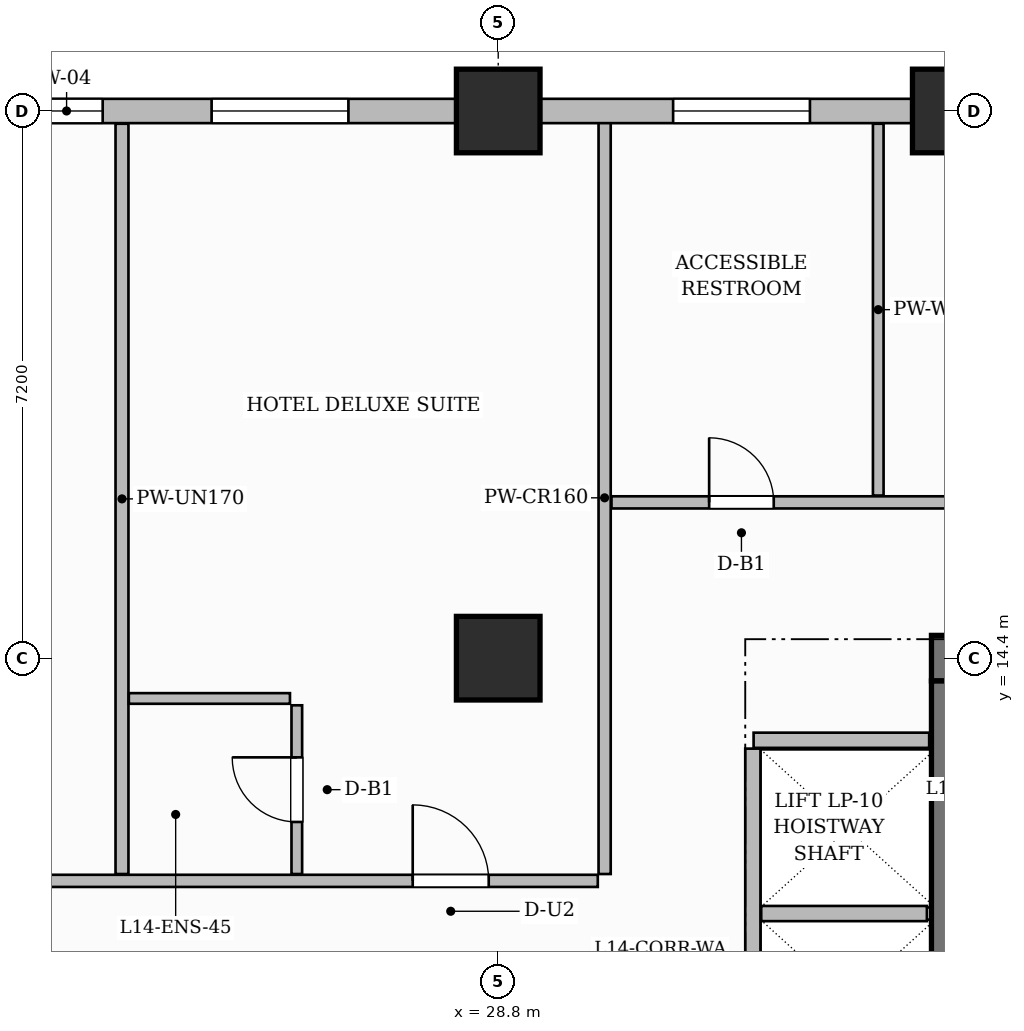
"""IFC4 building model, lengths in metres.
Left out: names, types, materials, properties, quantities, classifications, styles, units other than length and angle.
Written with IfcOpenShell. Run it as: python <this file> out.ifc"""

import sys

from ifc_helpers import new_model, si_unit, direction, frame, frame_2d, origin, origin_2d, place, context, subcontext, project, spatial, rectangle, extrude, source, transform, mapped, element, fill, save


model = new_model("IFC4")
c1 = context("Model", 3, precision=1e-05, world=origin(), true_north=direction((0.0, 1.0)))
c2 = subcontext(c1, "Body", "Model", "MODEL_VIEW")
j1 = project(units=[si_unit("LENGTHUNIT", "METRE"), si_unit("PLANEANGLEUNIT", "RADIAN")], contexts=[c1])
p1 = place(None, origin())
s1 = spatial("IfcSite", under=j1, at=p1, CompositionType="ELEMENT")
p2 = place(p1, origin())
s2 = spatial("IfcBuilding", under=s1, at=p2, CompositionType="ELEMENT")
p3 = place(p2, frame((0.0, 0.0, 62.0)))
s3 = spatial("IfcBuildingStorey", under=s2, at=p3, CompositionType="ELEMENT", Elevation=62.0)
p4 = place(p3, frame((34.5, 14.4, 0.0), z_axis=(0.0, 0.0, 1.0), x_axis=(1.0, 0.0, 0.0)))
e1 = element("IfcWall", 1, at=p4, inside=s3, PredefinedType="SHEAR", context=c2, shape_type="SweptSolid", body=[
    extrude(rectangle(XDim=15.6, YDim=0.6, at=frame_2d((7.8, 0.0))), origin(), (0.0, 0.0, 1.0), 3.7),
])
p5 = place(p4, frame((5.43, 0.0, 0.0)))
e2 = element("IfcOpeningElement", 2, at=p5, cuts=e1, PredefinedType="OPENING", context=c2, shape_type="SweptSolid", body=[
    extrude(rectangle(XDim=1.5, YDim=2.2, at=frame_2d((0.75, 1.1))), frame((0.0, 0.31, 0.0), z_axis=(0.0, -1.0, 0.0), x_axis=(1.0, 0.0, 0.0)), (0.0, 0.0, 1.0), 0.62),
])
p6 = place(p4, frame((1.645, 0.0, 0.0)))
e3 = element("IfcOpeningElement", 3, at=p6, cuts=e1, PredefinedType="OPENING", context=c2, shape_type="SweptSolid", body=[
    extrude(rectangle(XDim=1.05, YDim=2.15, at=frame_2d((0.525, 1.075))), frame((0.0, 0.31, 0.0), z_axis=(0.0, -1.0, 0.0), x_axis=(1.0, 0.0, 0.0)), (0.0, 0.0, 1.0), 0.62),
])
p7 = place(p4, frame((11.275, 0.0, 0.0)))
e4 = element("IfcOpeningElement", 4, at=p7, cuts=e1, PredefinedType="OPENING", context=c2, shape_type="SweptSolid", body=[
    extrude(rectangle(XDim=1.05, YDim=2.15, at=frame_2d((0.525, 1.075))), frame((0.0, 0.31, 0.0), z_axis=(0.0, -1.0, 0.0), x_axis=(1.0, 0.0, 0.0)), (0.0, 0.0, 1.0), 0.62),
])
p8 = place(p3, frame((34.8, 3.9, 0.0), z_axis=(0.0, 0.0, 1.0), x_axis=(0.0, 1.0, 0.0)))
e5 = element("IfcWall", 5, at=p8, inside=s3, PredefinedType="SHEAR", context=c2, shape_type="SweptSolid", body=[
    extrude(rectangle(XDim=10.2, YDim=0.6, at=frame_2d((5.1, 0.0))), origin(), (0.0, 0.0, 1.0), 3.7),
])
m1 = source(origin(), c2, "Body", "SweptSolid", [
    extrude(rectangle(XDim=1.1, YDim=1.1, at=origin_2d()), origin(), (0.0, 0.0, 1.0), 3.7),
])
for number, where, z_axis, x_axis in (
    (6, (28.8, 14.4, 0.0), (0.0, 0.0, 1.0), (1.0, 0.0, 0.0)),
    (7, (28.8, 21.6, 0.0), (0.0, 0.0, 1.0), (1.0, 0.0, 0.0)),
    (8, (34.8, 21.6, 0.0), (0.0, 0.0, 1.0), (1.0, 0.0, 0.0)),
):
    element("IfcColumn", number, at=place(p3, frame(where, z_axis=z_axis, x_axis=x_axis)), inside=s3, PredefinedType="COLUMN", context=c2, shape_type="MappedRepresentation", body=[
        mapped(m1, transform((0.0, 0.0, 0.0), scale=1.0)),
    ])
p9 = place(p3, frame((32.16, 13.32, 0.0), z_axis=(0.0, 0.0, 1.0), x_axis=(1.0, 0.0, 0.0)))
e9 = element("IfcWall", 9, at=p9, inside=s3, PredefinedType="PARTITIONING", context=c2, shape_type="SweptSolid", body=[
    extrude(rectangle(XDim=2.31, YDim=0.2, at=frame_2d((1.155, 0.0))), origin(), (0.0, 0.0, 1.0), 3.45),
])
p10 = place(p3, frame((32.15, 4.39, 0.0), z_axis=(0.0, 0.0, 1.0), x_axis=(0.0, 1.0, 0.0)))
e10 = element("IfcWall", 10, at=p10, inside=s3, PredefinedType="PARTITIONING", context=c2, shape_type="SweptSolid", body=[
    extrude(rectangle(XDim=8.82, YDim=0.2, at=frame_2d((4.41, 0.0))), origin(), (0.0, 0.0, 1.0), 3.45),
])
p11 = place(p3, frame((32.26, 11.04, 0.0), z_axis=(0.0, 0.0, 1.0), x_axis=(1.0, 0.0, 0.0)))
e11 = element("IfcWall", 11, at=p11, inside=s3, PredefinedType="PARTITIONING", context=c2, shape_type="SweptSolid", body=[
    extrude(rectangle(XDim=2.18, YDim=0.2, at=frame_2d((1.09, 0.0))), origin(), (0.0, 0.0, 1.0), 3.45),
])
p12 = place(p3, frame((14.568, 11.47, 0.0), z_axis=(0.0, 0.0, 1.0), x_axis=(1.0, 0.0, 0.0)))
e12 = element("IfcWall", 12, at=p12, inside=s3, PredefinedType="PARTITIONING", context=c2, shape_type="SweptSolid", body=[
    extrude(rectangle(XDim=15.542, YDim=0.16, at=frame_2d((7.771, 0.0))), origin(), (0.0, 0.0, 1.0), 3.45),
])
p13 = place(p12, frame((4.132, 0.0, 0.0)))
e13 = element("IfcOpeningElement", 13, at=p13, cuts=e12, PredefinedType="OPENING", context=c2, shape_type="SweptSolid", body=[
    extrude(rectangle(XDim=0.95, YDim=2.15, at=frame_2d((0.475, 1.075))), frame((0.0, 0.09, 0.0), z_axis=(0.0, -1.0, 0.0), x_axis=(1.0, 0.0, 0.0)), (0.0, 0.0, 1.0), 0.18),
])
p14 = place(p12, frame((13.107, 0.0, 0.0)))
e14 = element("IfcOpeningElement", 14, at=p14, cuts=e12, PredefinedType="OPENING", context=c2, shape_type="SweptSolid", body=[
    extrude(rectangle(XDim=1.0, YDim=2.2, at=frame_2d((0.5, 1.1))), frame((0.0, 0.09, 0.0), z_axis=(0.0, -1.0, 0.0), x_axis=(1.0, 0.0, 0.0)), (0.0, 0.0, 1.0), 0.18),
])
p15 = place(p3, frame((30.2, 11.56, 0.0), z_axis=(0.0, 0.0, 1.0), x_axis=(0.0, 1.0, 0.0)))
e15 = element("IfcWall", 15, at=p15, inside=s3, PredefinedType="PARTITIONING", context=c2, shape_type="SweptSolid", body=[
    extrude(rectangle(XDim=9.9, YDim=0.16, at=frame_2d((4.95, 0.0))), origin(), (0.0, 0.0, 1.0), 3.45),
])
p16 = place(p3, frame((30.29, 16.45, 0.0), z_axis=(0.0, 0.0, 1.0), x_axis=(1.0, 0.0, 0.0)))
e16 = element("IfcWall", 16, at=p16, inside=s3, PredefinedType="PARTITIONING", context=c2, shape_type="SweptSolid", body=[
    extrude(rectangle(XDim=19.37, YDim=0.16, at=frame_2d((9.685, 0.0))), origin(), (0.0, 0.0, 1.0), 3.45),
])
p17 = place(p16, frame((1.285, 0.0, 0.0)))
e17 = element("IfcOpeningElement", 17, at=p17, cuts=e16, PredefinedType="OPENING", context=c2, shape_type="SweptSolid", body=[
    extrude(rectangle(XDim=0.85, YDim=2.1, at=frame_2d((0.425, 1.05))), frame((0.0, 0.09, 0.0), z_axis=(0.0, -1.0, 0.0), x_axis=(1.0, 0.0, 0.0)), (0.0, 0.0, 1.0), 0.18),
])
p18 = place(p16, frame((10.66, 0.0, 0.0)))
e18 = element("IfcOpeningElement", 18, at=p18, cuts=e16, PredefinedType="OPENING", context=c2, shape_type="SweptSolid", body=[
    extrude(rectangle(XDim=1.6, YDim=2.4, at=frame_2d((0.8, 1.2))), frame((0.0, 0.09, 0.0), z_axis=(0.0, -1.0, 0.0), x_axis=(1.0, 0.0, 0.0)), (0.0, 0.0, 1.0), 0.18),
])
p19 = place(p3, frame((33.8, 16.54, 0.0), z_axis=(0.0, 0.0, 1.0), x_axis=(0.0, 1.0, 0.0)))
e19 = element("IfcWall", 19, at=p19, inside=s3, PredefinedType="PARTITIONING", context=c2, shape_type="SweptSolid", body=[
    extrude(rectangle(XDim=4.892, YDim=0.14, at=frame_2d((2.446, 0.0))), origin(), (0.0, 0.0, 1.0), 3.45),
])
p20 = place(p3, frame((23.85, 11.56, 0.0), z_axis=(0.0, 0.0, 1.0), x_axis=(0.0, 1.0, 0.0)))
e20 = element("IfcWall", 20, at=p20, inside=s3, PredefinedType="PARTITIONING", context=c2, shape_type="SweptSolid", body=[
    extrude(rectangle(XDim=9.872, YDim=0.17, at=frame_2d((4.936, 0.0))), origin(), (0.0, 0.0, 1.0), 3.45),
])
p21 = place(p3, frame((26.15, 11.56, 0.0), z_axis=(0.0, 0.0, 1.0), x_axis=(0.0, 1.0, 0.0)))
e21 = element("IfcWall", 21, at=p21, inside=s3, PredefinedType="PARTITIONING", context=c2, shape_type="SweptSolid", body=[
    extrude(rectangle(XDim=2.22, YDim=0.14, at=frame_2d((1.11, 0.0))), origin(), (0.0, 0.0, 1.0), 3.45),
])
p22 = place(p21, frame((0.685, 0.0, 0.0)))
e22 = element("IfcOpeningElement", 22, at=p22, cuts=e21, PredefinedType="OPENING", context=c2, shape_type="SweptSolid", body=[
    extrude(rectangle(XDim=0.85, YDim=2.1, at=frame_2d((0.425, 1.05))), frame((0.0, 0.08, 0.0), z_axis=(0.0, -1.0, 0.0), x_axis=(1.0, 0.0, 0.0)), (0.0, 0.0, 1.0), 0.16),
])
p23 = place(p3, frame((23.94, 13.87, 0.0), z_axis=(0.0, 0.0, 1.0), x_axis=(1.0, 0.0, 0.0)))
e23 = element("IfcWall", 23, at=p23, inside=s3, PredefinedType="PARTITIONING", context=c2, shape_type="SweptSolid", body=[
    extrude(rectangle(XDim=2.12, YDim=0.14, at=frame_2d((1.06, 0.0))), origin(), (0.0, 0.0, 1.0), 3.45),
])
p24 = place(p3, frame((14.4, 21.6, 0.0), z_axis=(0.0, 0.0, 1.0), x_axis=(1.0, 0.0, 0.0)))
e24 = element("IfcWall", 24, at=p24, inside=s3, PredefinedType="SOLIDWALL", context=c2, shape_type="SweptSolid", body=[
    extrude(rectangle(XDim=43.2, YDim=0.32, at=frame_2d((21.6, 0.0))), origin(), (0.0, 0.0, 1.0), 2.885),
])
p25 = place(p24, frame((1.5, 0.0, 0.0)))
e25 = element("IfcOpeningElement", 25, at=p25, cuts=e24, PredefinedType="OPENING", context=c2, shape_type="SweptSolid", body=[
    extrude(rectangle(XDim=1.2, YDim=2.2, at=frame_2d((0.6, 1.1))), frame((0.0, 0.17, 0.0), z_axis=(0.0, -1.0, 0.0), x_axis=(1.0, 0.0, 0.0)), (0.0, 0.0, 1.0), 0.34),
])
p26 = place(p24, frame((3.8, 0.0, 0.8)))
e26 = element("IfcOpeningElement", 26, at=p26, cuts=e24, PredefinedType="OPENING", context=c2, shape_type="SweptSolid", body=[
    extrude(rectangle(XDim=1.8, YDim=1.85, at=frame_2d((0.9, 0.925))), frame((0.0, 0.17, 0.0), z_axis=(0.0, -1.0, 0.0), x_axis=(1.0, 0.0, 0.0)), (0.0, 0.0, 1.0), 0.34),
])
p27 = place(p24, frame((8.246, 0.0, 0.8)))
e27 = element("IfcOpeningElement", 27, at=p27, cuts=e24, PredefinedType="OPENING", context=c2, shape_type="SweptSolid", body=[
    extrude(rectangle(XDim=0.95, YDim=1.75, at=frame_2d((0.475, 0.875))), frame((0.0, 0.17, 0.0), z_axis=(0.0, -1.0, 0.0), x_axis=(1.0, 0.0, 0.0)), (0.0, 0.0, 1.0), 0.34),
])
p28 = place(p24, frame((10.629, 0.0, 0.8)))
e28 = element("IfcOpeningElement", 28, at=p28, cuts=e24, PredefinedType="OPENING", context=c2, shape_type="SweptSolid", body=[
    extrude(rectangle(XDim=1.8, YDim=1.85, at=frame_2d((0.9, 0.925))), frame((0.0, 0.17, 0.0), z_axis=(0.0, -1.0, 0.0), x_axis=(1.0, 0.0, 0.0)), (0.0, 0.0, 1.0), 0.34),
])
p29 = place(p24, frame((16.701, 0.0, 0.8)))
e29 = element("IfcOpeningElement", 29, at=p29, cuts=e24, PredefinedType="OPENING", context=c2, shape_type="SweptSolid", body=[
    extrude(rectangle(XDim=1.8, YDim=1.85, at=frame_2d((0.9, 0.925))), frame((0.0, 0.17, 0.0), z_axis=(0.0, -1.0, 0.0), x_axis=(1.0, 0.0, 0.0)), (0.0, 0.0, 1.0), 0.34),
])
p30 = place(p24, frame((21.725, 0.0, 0.8)))
e30 = element("IfcOpeningElement", 30, at=p30, cuts=e24, PredefinedType="OPENING", context=c2, shape_type="SweptSolid", body=[
    extrude(rectangle(XDim=1.8, YDim=1.85, at=frame_2d((0.9, 0.925))), frame((0.0, 0.17, 0.0), z_axis=(0.0, -1.0, 0.0), x_axis=(1.0, 0.0, 0.0)), (0.0, 0.0, 1.0), 0.34),
])
p31 = place(p24, frame((24.475, 0.0, 0.8)))
e31 = element("IfcOpeningElement", 31, at=p31, cuts=e24, PredefinedType="OPENING", context=c2, shape_type="SweptSolid", body=[
    extrude(rectangle(XDim=1.8, YDim=1.85, at=frame_2d((0.9, 0.925))), frame((0.0, 0.17, 0.0), z_axis=(0.0, -1.0, 0.0), x_axis=(1.0, 0.0, 0.0)), (0.0, 0.0, 1.0), 0.34),
])
p32 = place(p24, frame((29.075, 0.0, 0.8)))
e32 = element("IfcOpeningElement", 32, at=p32, cuts=e24, PredefinedType="OPENING", context=c2, shape_type="SweptSolid", body=[
    extrude(rectangle(XDim=1.8, YDim=1.85, at=frame_2d((0.9, 0.925))), frame((0.0, 0.17, 0.0), z_axis=(0.0, -1.0, 0.0), x_axis=(1.0, 0.0, 0.0)), (0.0, 0.0, 1.0), 0.34),
])
p33 = place(p24, frame((32.125, 0.0, 0.8)))
e33 = element("IfcOpeningElement", 33, at=p33, cuts=e24, PredefinedType="OPENING", context=c2, shape_type="SweptSolid", body=[
    extrude(rectangle(XDim=1.8, YDim=1.85, at=frame_2d((0.9, 0.925))), frame((0.0, 0.17, 0.0), z_axis=(0.0, -1.0, 0.0), x_axis=(1.0, 0.0, 0.0)), (0.0, 0.0, 1.0), 0.34),
])
p34 = place(p24, frame((36.875, 0.0, 0.8)))
e34 = element("IfcOpeningElement", 34, at=p34, cuts=e24, PredefinedType="OPENING", context=c2, shape_type="SweptSolid", body=[
    extrude(rectangle(XDim=1.8, YDim=1.85, at=frame_2d((0.9, 0.925))), frame((0.0, 0.17, 0.0), z_axis=(0.0, -1.0, 0.0), x_axis=(1.0, 0.0, 0.0)), (0.0, 0.0, 1.0), 0.34),
])
p35 = place(p24, frame((39.925, 0.0, 0.8)))
e35 = element("IfcOpeningElement", 35, at=p35, cuts=e24, PredefinedType="OPENING", context=c2, shape_type="SweptSolid", body=[
    extrude(rectangle(XDim=1.8, YDim=1.85, at=frame_2d((0.9, 0.925))), frame((0.0, 0.17, 0.0), z_axis=(0.0, -1.0, 0.0), x_axis=(1.0, 0.0, 0.0)), (0.0, 0.0, 1.0), 0.34),
])
m2 = source(origin(), c2, "Body", "SweptSolid", [
    extrude(rectangle(XDim=0.85, YDim=2.1, at=frame_2d((0.425, 1.05))), frame((0.0, 0.025, 0.0), z_axis=(0.0, -1.0, 0.0), x_axis=(1.0, 0.0, 0.0)), (0.0, 0.0, 1.0), 0.05),
])
p36 = place(p17, origin())
e36 = element("IfcDoor", 36, at=p36, inside=s3, OperationType="SINGLE_SWING_LEFT", PredefinedType="DOOR", context=c2, shape_type="MappedRepresentation", body=[
    mapped(m2, transform((0.0, 0.0, 0.0), scale=1.0)),
])
fill(e17, e36)
p37 = place(p22, origin())
e37 = element("IfcDoor", 37, at=p37, inside=s3, OperationType="SINGLE_SWING_RIGHT", PredefinedType="DOOR", context=c2, shape_type="MappedRepresentation", body=[
    mapped(m2, transform((0.0, 0.0, 0.0), scale=1.0)),
])
fill(e22, e37)
m3 = source(origin(), c2, "Body", "SweptSolid", [
    extrude(rectangle(XDim=1.0, YDim=2.2, at=frame_2d((0.5, 1.1))), frame((0.0, 0.025, 0.0), z_axis=(0.0, -1.0, 0.0), x_axis=(1.0, 0.0, 0.0)), (0.0, 0.0, 1.0), 0.05),
])
p38 = place(p14, origin())
e38 = element("IfcDoor", 38, at=p38, inside=s3, OperationType="SINGLE_SWING_LEFT", PredefinedType="DOOR", context=c2, shape_type="MappedRepresentation", body=[
    mapped(m3, transform((0.0, 0.0, 0.0), scale=1.0)),
])
fill(e14, e38)
m4 = source(origin(), c2, "Body", "SweptSolid", [
    extrude(rectangle(XDim=0.95, YDim=1.75, at=frame_2d((0.475, 0.875))), frame((0.0, 0.03, 0.0), z_axis=(0.0, -1.0, 0.0), x_axis=(1.0, 0.0, 0.0)), (0.0, 0.0, 1.0), 0.06),
])
p39 = place(p27, origin())
e39 = element("IfcWindow", 39, at=p39, inside=s3, PartitioningType="SINGLE_PANEL", PredefinedType="WINDOW", context=c2, shape_type="MappedRepresentation", body=[
    mapped(m4, transform((0.0, 0.0, 0.0), scale=1.0)),
])
fill(e27, e39)
m5 = source(origin(), c2, "Body", "SweptSolid", [
    extrude(rectangle(XDim=1.8, YDim=1.85, at=frame_2d((0.9, 0.925))), frame((0.0, 0.03, 0.0), z_axis=(0.0, -1.0, 0.0), x_axis=(1.0, 0.0, 0.0)), (0.0, 0.0, 1.0), 0.06),
])
p40 = place(p28, origin())
e40 = element("IfcWindow", 40, at=p40, inside=s3, PartitioningType="DOUBLE_PANEL_VERTICAL", PredefinedType="WINDOW", context=c2, shape_type="MappedRepresentation", body=[
    mapped(m5, transform((0.0, 0.0, 0.0), scale=1.0)),
])
fill(e28, e40)
p41 = place(p29, origin())
e41 = element("IfcWindow", 41, at=p41, inside=s3, PartitioningType="DOUBLE_PANEL_VERTICAL", PredefinedType="WINDOW", context=c2, shape_type="MappedRepresentation", body=[
    mapped(m5, transform((0.0, 0.0, 0.0), scale=1.0)),
])
fill(e29, e41)
save(model, sys.argv[1])
